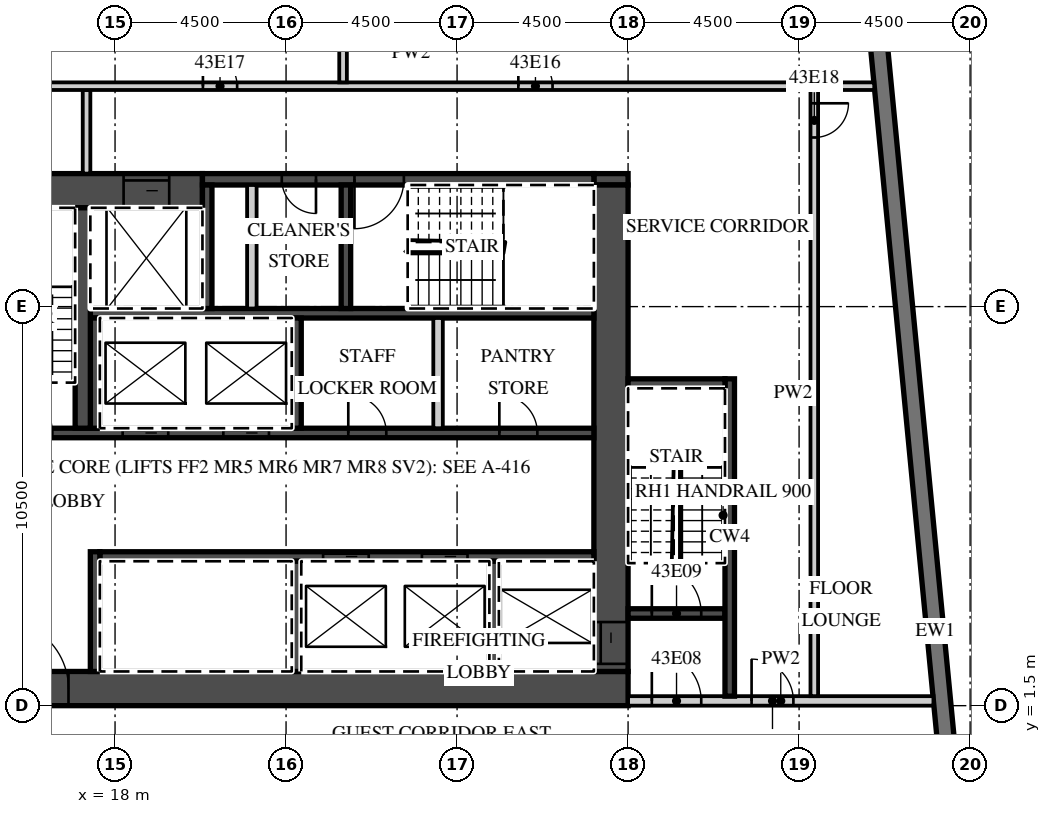
"""IFC4 building model, lengths in metres.
Left out: names, types, materials, properties, quantities, classifications, styles, units other than length and angle.
Written with IfcOpenShell. Run it as: python <this file> out.ifc"""

import sys

from ifc_helpers import new_model, si_unit, direction, frame, frame_2d, origin, place, context, subcontext, project, spatial, rectangle, extrude, element, fill, save


model = new_model("IFC4")
c1 = context("Model", 3, precision=1e-05, world=origin(), true_north=direction((0.0, 1.0)))
c2 = subcontext(c1, "Body", "Model", "MODEL_VIEW")
j1 = project(units=[si_unit("LENGTHUNIT", "METRE"), si_unit("PLANEANGLEUNIT", "RADIAN")], contexts=[c1])
p1 = place(None, origin())
s1 = spatial("IfcSite", under=j1, at=p1, CompositionType="ELEMENT")
p2 = place(p1, origin())
s2 = spatial("IfcBuilding", under=s1, at=p2, CompositionType="ELEMENT")
p3 = place(p2, frame((0.0, 0.0, 183.4)))
s3 = spatial("IfcBuildingStorey", under=s2, at=p3, CompositionType="ELEMENT", Elevation=183.4)
p4 = place(p3, frame((41.214, -13.466, 0.0), z_axis=(0.0, 0.0, 1.0), x_axis=(-0.095847314626, 0.995396047952, 0.0)))
e1 = element("IfcWall", 1, at=p4, inside=s3, PredefinedType="SOLIDWALL", context=c2, shape_type="SweptSolid", body=[
    extrude(rectangle(XDim=34.0, YDim=0.45, at=frame_2d((17.0, 0.0))), origin(), (0.0, 0.0, 1.0), 3.02),
])
p5 = place(p4, frame((3.869, 0.0, 0.45)))
e2 = element("IfcOpeningElement", 2, at=p5, cuts=e1, PredefinedType="OPENING", context=c2, shape_type="SweptSolid", body=[
    extrude(rectangle(XDim=3.3, YDim=2.25, at=frame_2d((1.65, 1.125))), frame((0.0, 0.235, 0.0), z_axis=(0.0, -1.0, 0.0), x_axis=(1.0, 0.0, 0.0)), (0.0, 0.0, 1.0), 0.47),
])
p6 = place(p4, frame((8.39, 0.0, 0.45)))
e3 = element("IfcOpeningElement", 3, at=p6, cuts=e1, PredefinedType="OPENING", context=c2, shape_type="SweptSolid", body=[
    extrude(rectangle(XDim=3.3, YDim=2.25, at=frame_2d((1.65, 1.125))), frame((0.0, 0.235, 0.0), z_axis=(0.0, -1.0, 0.0), x_axis=(1.0, 0.0, 0.0)), (0.0, 0.0, 1.0), 0.47),
])
p7 = place(p3, frame((13.5, 1.95, 0.0), z_axis=(0.0, 0.0, 1.0), x_axis=(1.0, 0.0, 0.0)))
e4 = element("IfcWall", 4, at=p7, inside=s3, PredefinedType="SHEAR", context=c2, shape_type="SweptSolid", body=[
    extrude(rectangle(XDim=18.0, YDim=0.9, at=frame_2d((9.0, 0.0))), origin(), (0.0, 0.0, 1.0), 3.02),
])
p8 = place(p7, frame((1.475, 0.0, 0.0)))
e5 = element("IfcOpeningElement", 5, at=p8, cuts=e4, PredefinedType="OPENING", context=c2, shape_type="SweptSolid", body=[
    extrude(rectangle(XDim=1.8, YDim=2.1, at=frame_2d((0.9, 1.05))), frame((0.0, 0.46, 0.0), z_axis=(0.0, -1.0, 0.0), x_axis=(1.0, 0.0, 0.0)), (0.0, 0.0, 1.0), 0.92),
])
p9 = place(p3, frame((13.5, 15.05, 0.0), z_axis=(0.0, 0.0, 1.0), x_axis=(1.0, 0.0, 0.0)))
e6 = element("IfcWall", 6, at=p9, inside=s3, PredefinedType="SHEAR", context=c2, shape_type="SweptSolid", body=[
    extrude(rectangle(XDim=6.8, YDim=0.9, at=frame_2d((3.4, 0.0))), origin(), (0.0, 0.0, 1.0), 3.02),
])
p10 = place(p9, frame((4.725, 0.0, 0.0)))
e7 = element("IfcOpeningElement", 7, at=p10, cuts=e6, PredefinedType="OPENING", context=c2, shape_type="SweptSolid", body=[
    extrude(rectangle(XDim=1.2, YDim=2.1, at=frame_2d((0.6, 1.05))), frame((0.0, 0.46, 0.0), z_axis=(0.0, -1.0, 0.0), x_axis=(1.0, 0.0, 0.0)), (0.0, 0.0, 1.0), 0.92),
])
p11 = place(p3, frame((30.6, 15.35, 0.0), z_axis=(0.0, 0.0, 1.0), x_axis=(1.0, 0.0, 0.0)))
e8 = element("IfcWall", 8, at=p11, inside=s3, PredefinedType="SHEAR", context=c2, shape_type="SweptSolid", body=[
    extrude(rectangle(XDim=0.9, YDim=0.3, at=frame_2d((0.45, 0.0))), origin(), (0.0, 0.0, 1.0), 3.02),
])
p12 = place(p3, frame((20.3, 15.35, 0.0), z_axis=(0.0, 0.0, 1.0), x_axis=(1.0, 0.0, 0.0)))
e9 = element("IfcWall", 9, at=p12, inside=s3, PredefinedType="SHEAR", context=c2, shape_type="SweptSolid", body=[
    extrude(rectangle(XDim=10.3, YDim=0.3, at=frame_2d((5.15, 0.0))), origin(), (0.0, 0.0, 1.0), 3.02),
])
p13 = place(p12, frame((4.0, 0.0, 0.0)))
e10 = element("IfcOpeningElement", 10, at=p13, cuts=e9, PredefinedType="OPENING", context=c2, shape_type="SweptSolid", body=[
    extrude(rectangle(XDim=1.3, YDim=2.1, at=frame_2d((0.65, 1.05))), frame((0.0, 0.16, 0.0), z_axis=(0.0, -1.0, 0.0), x_axis=(1.0, 0.0, 0.0)), (0.0, 0.0, 1.0), 0.32),
])
p14 = place(p12, frame((2.087, 0.0, 0.0)))
e11 = element("IfcOpeningElement", 11, at=p14, cuts=e9, PredefinedType="OPENING", context=c2, shape_type="SweptSolid", body=[
    extrude(rectangle(XDim=0.9, YDim=2.1, at=frame_2d((0.45, 1.05))), frame((0.0, 0.16, 0.0), z_axis=(0.0, -1.0, 0.0), x_axis=(1.0, 0.0, 0.0)), (0.0, 0.0, 1.0), 0.32),
])
p15 = place(p3, frame((31.05, 2.4, 0.0), z_axis=(0.0, 0.0, 1.0), x_axis=(0.0, 1.0, 0.0)))
e12 = element("IfcWall", 12, at=p15, inside=s3, PredefinedType="SHEAR", context=c2, shape_type="SweptSolid", body=[
    extrude(rectangle(XDim=12.8, YDim=0.9, at=frame_2d((6.4, 0.0))), origin(), (0.0, 0.0, 1.0), 3.02),
])
p16 = place(p15, frame((0.2, 0.0, 0.0)))
e13 = element("IfcOpeningElement", 13, at=p16, cuts=e12, PredefinedType="OPENING", context=c2, shape_type="SweptSolid", body=[
    extrude(rectangle(XDim=1.1, YDim=2.1, at=frame_2d((0.55, 1.05))), frame((0.0, 0.46, 0.0), z_axis=(0.0, -1.0, 0.0), x_axis=(1.0, 0.0, 0.0)), (0.0, 0.0, 1.0), 0.92),
])
p17 = place(p3, frame((17.6, 5.425, 0.0), z_axis=(0.0, 0.0, 1.0), x_axis=(1.0, 0.0, 0.0)))
e14 = element("IfcWall", 14, at=p17, inside=s3, PredefinedType="SHEAR", context=c2, shape_type="SweptSolid", body=[
    extrude(rectangle(XDim=13.0, YDim=0.25, at=frame_2d((6.5, 0.0))), origin(), (0.0, 0.0, 1.0), 3.02),
])
p18 = place(p17, frame((8.475, 0.0, 0.0)))
e15 = element("IfcOpeningElement", 15, at=p18, cuts=e14, PredefinedType="OPENING", context=c2, shape_type="SweptSolid", body=[
    extrude(rectangle(XDim=1.2, YDim=2.1, at=frame_2d((0.6, 1.05))), frame((0.0, 0.135, 0.0), z_axis=(0.0, -1.0, 0.0), x_axis=(1.0, 0.0, 0.0)), (0.0, 0.0, 1.0), 0.27),
])
p19 = place(p17, frame((5.875, 0.0, 0.0)))
e16 = element("IfcOpeningElement", 16, at=p19, cuts=e14, PredefinedType="OPENING", context=c2, shape_type="SweptSolid", body=[
    extrude(rectangle(XDim=1.2, YDim=2.1, at=frame_2d((0.6, 1.05))), frame((0.0, 0.135, 0.0), z_axis=(0.0, -1.0, 0.0), x_axis=(1.0, 0.0, 0.0)), (0.0, 0.0, 1.0), 0.27),
])
p20 = place(p3, frame((17.475, 2.4, 0.0), z_axis=(0.0, 0.0, 1.0), x_axis=(0.0, 1.0, 0.0)))
e17 = element("IfcWall", 17, at=p20, inside=s3, PredefinedType="SHEAR", context=c2, shape_type="SweptSolid", body=[
    extrude(rectangle(XDim=3.15, YDim=0.25, at=frame_2d((1.575, 0.0))), origin(), (0.0, 0.0, 1.0), 3.02),
])
for number, where, z_axis, x_axis in (
    (18, (27.975, 2.4, 0.0), (0.0, 0.0, 1.0), (0.0, 1.0, 0.0)),
    (19, (22.775, 2.4, 0.0), (0.0, 0.0, 1.0), (0.0, 1.0, 0.0)),
):
    element("IfcWall", number, at=place(p3, frame(where, z_axis=z_axis, x_axis=x_axis)), inside=s3, PredefinedType="SHEAR", context=c2, shape_type="SweptSolid", body=[
        extrude(rectangle(XDim=2.9, YDim=0.25, at=frame_2d((1.45, 0.0))), origin(), (0.0, 0.0, 1.0), 3.02),
    ])
p21 = place(p3, frame((14.4, 8.675, 0.0), z_axis=(0.0, 0.0, 1.0), x_axis=(1.0, 0.0, 0.0)))
e20 = element("IfcWall", 20, at=p21, inside=s3, PredefinedType="SHEAR", context=c2, shape_type="SweptSolid", body=[
    extrude(rectangle(XDim=16.2, YDim=0.25, at=frame_2d((8.1, 0.0))), origin(), (0.0, 0.0, 1.0), 3.02),
])
p22 = place(p21, frame((6.45, 0.0, 0.0)))
e21 = element("IfcOpeningElement", 21, at=p22, cuts=e20, PredefinedType="OPENING", context=c2, shape_type="SweptSolid", body=[
    extrude(rectangle(XDim=1.2, YDim=2.1, at=frame_2d((0.6, 1.05))), frame((0.0, 0.135, 0.0), z_axis=(0.0, -1.0, 0.0), x_axis=(1.0, 0.0, 0.0)), (0.0, 0.0, 1.0), 0.27),
])
p23 = place(p21, frame((3.8, 0.0, 0.0)))
e22 = element("IfcOpeningElement", 22, at=p23, cuts=e20, PredefinedType="OPENING", context=c2, shape_type="SweptSolid", body=[
    extrude(rectangle(XDim=1.2, YDim=2.1, at=frame_2d((0.6, 1.05))), frame((0.0, 0.135, 0.0), z_axis=(0.0, -1.0, 0.0), x_axis=(1.0, 0.0, 0.0)), (0.0, 0.0, 1.0), 0.27),
])
p24 = place(p21, frame((0.65, 0.0, 0.0)))
e23 = element("IfcOpeningElement", 23, at=p24, cuts=e20, PredefinedType="OPENING", context=c2, shape_type="SweptSolid", body=[
    extrude(rectangle(XDim=1.3, YDim=2.1, at=frame_2d((0.65, 1.05))), frame((0.0, 0.135, 0.0), z_axis=(0.0, -1.0, 0.0), x_axis=(1.0, 0.0, 0.0)), (0.0, 0.0, 1.0), 0.27),
])
p25 = place(p21, frame((13.712, 0.0, 0.0)))
e24 = element("IfcOpeningElement", 24, at=p25, cuts=e20, PredefinedType="OPENING", context=c2, shape_type="SweptSolid", body=[
    extrude(rectangle(XDim=1.0, YDim=2.1, at=frame_2d((0.5, 1.05))), frame((0.0, 0.135, 0.0), z_axis=(0.0, -1.0, 0.0), x_axis=(1.0, 0.0, 0.0)), (0.0, 0.0, 1.0), 0.27),
])
p26 = place(p21, frame((9.738, 0.0, 0.0)))
e25 = element("IfcOpeningElement", 25, at=p26, cuts=e20, PredefinedType="OPENING", context=c2, shape_type="SweptSolid", body=[
    extrude(rectangle(XDim=1.0, YDim=2.1, at=frame_2d((0.5, 1.05))), frame((0.0, 0.135, 0.0), z_axis=(0.0, -1.0, 0.0), x_axis=(1.0, 0.0, 0.0)), (0.0, 0.0, 1.0), 0.27),
])
p27 = place(p3, frame((17.35, 11.825, 0.0), z_axis=(0.0, 0.0, 1.0), x_axis=(1.0, 0.0, 0.0)))
e26 = element("IfcWall", 26, at=p27, inside=s3, PredefinedType="SHEAR", context=c2, shape_type="SweptSolid", body=[
    extrude(rectangle(XDim=13.25, YDim=0.25, at=frame_2d((6.625, 0.0))), origin(), (0.0, 0.0, 1.0), 3.02),
])
for number, where, z_axis, x_axis in (
    (27, (17.475, 8.8, 0.0), (0.0, 0.0, 1.0), (0.0, 1.0, 0.0)),
    (28, (22.775, 8.8, 0.0), (0.0, 0.0, 1.0), (0.0, 1.0, 0.0)),
):
    element("IfcWall", number, at=place(p3, frame(where, z_axis=z_axis, x_axis=x_axis)), inside=s3, PredefinedType="SHEAR", context=c2, shape_type="SweptSolid", body=[
        extrude(rectangle(XDim=2.9, YDim=0.25, at=frame_2d((1.45, 0.0))), origin(), (0.0, 0.0, 1.0), 3.02),
    ])
p28 = place(p3, frame((26.5, 8.8, 0.0), z_axis=(0.0, 0.0, 1.0), x_axis=(0.0, 1.0, 0.0)))
e29 = element("IfcWall", 29, at=p28, inside=s3, PredefinedType="PARTITIONING", context=c2, shape_type="SweptSolid", body=[
    extrude(rectangle(XDim=2.9, YDim=0.25, at=frame_2d((1.45, 0.0))), origin(), (0.0, 0.0, 1.0), 3.02),
])
p29 = place(p3, frame((17.15, 8.8, 0.0), z_axis=(0.0, 0.0, 1.0), x_axis=(0.0, 1.0, 0.0)))
e30 = element("IfcWall", 30, at=p29, inside=s3, PredefinedType="SHEAR", context=c2, shape_type="SweptSolid", body=[
    extrude(rectangle(XDim=5.8, YDim=0.4, at=frame_2d((2.9, 0.0))), origin(), (0.0, 0.0, 1.0), 3.02),
])
for number, where, z_axis, x_axis in (
    (31, (20.425, 11.95, 0.0), (0.0, 0.0, 1.0), (0.0, 1.0, 0.0)),
    (32, (24.075, 11.95, 0.0), (0.0, 0.0, 1.0), (0.0, 1.0, 0.0)),
):
    element("IfcWall", number, at=place(p3, frame(where, z_axis=z_axis, x_axis=x_axis)), inside=s3, PredefinedType="SHEAR", context=c2, shape_type="SweptSolid", body=[
        extrude(rectangle(XDim=3.25, YDim=0.25, at=frame_2d((1.625, 0.0))), origin(), (0.0, 0.0, 1.0), 3.02),
    ])
p30 = place(p3, frame((21.6, 11.95, 0.0), z_axis=(0.0, 0.0, 1.0), x_axis=(0.0, 1.0, 0.0)))
e33 = element("IfcWall", 33, at=p30, inside=s3, PredefinedType="PARTITIONING", context=c2, shape_type="SweptSolid", body=[
    extrude(rectangle(XDim=3.25, YDim=0.25, at=frame_2d((1.625, 0.0))), origin(), (0.0, 0.0, 1.0), 3.02),
])
p31 = place(p3, frame((31.5, 1.625, 0.0), z_axis=(0.0, 0.0, 1.0), x_axis=(1.0, 0.0, 0.0)))
e34 = element("IfcWall", 34, at=p31, inside=s3, PredefinedType="PARTITIONING", context=c2, shape_type="SweptSolid", body=[
    extrude(rectangle(XDim=8.035, YDim=0.25, at=frame_2d((4.018, 0.0))), origin(), (0.0, 0.0, 1.0), 3.02),
])
p32 = place(p31, frame((0.625, 0.0, 0.0)))
e35 = element("IfcOpeningElement", 35, at=p32, cuts=e34, PredefinedType="OPENING", context=c2, shape_type="SweptSolid", body=[
    extrude(rectangle(XDim=1.3, YDim=2.1, at=frame_2d((0.65, 1.05))), frame((0.0, 0.135, 0.0), z_axis=(0.0, -1.0, 0.0), x_axis=(1.0, 0.0, 0.0)), (0.0, 0.0, 1.0), 0.27),
])
p33 = place(p31, frame((3.25, 0.0, 0.0)))
e36 = element("IfcOpeningElement", 36, at=p33, cuts=e34, PredefinedType="OPENING", context=c2, shape_type="SweptSolid", body=[
    extrude(rectangle(XDim=1.1, YDim=2.1, at=frame_2d((0.55, 1.05))), frame((0.0, 0.135, 0.0), z_axis=(0.0, -1.0, 0.0), x_axis=(1.0, 0.0, 0.0)), (0.0, 0.0, 1.0), 0.27),
])
p34 = place(p3, frame((31.5, 3.925, 0.0), z_axis=(0.0, 0.0, 1.0), x_axis=(1.0, 0.0, 0.0)))
e37 = element("IfcWall", 37, at=p34, inside=s3, PredefinedType="SHEAR", context=c2, shape_type="SweptSolid", body=[
    extrude(rectangle(XDim=2.55, YDim=0.25, at=frame_2d((1.275, 0.0))), origin(), (0.0, 0.0, 1.0), 3.02),
])
p35 = place(p34, frame((0.625, 0.0, 0.0)))
e38 = element("IfcOpeningElement", 38, at=p35, cuts=e37, PredefinedType="OPENING", context=c2, shape_type="SweptSolid", body=[
    extrude(rectangle(XDim=1.3, YDim=2.1, at=frame_2d((0.65, 1.05))), frame((0.0, 0.135, 0.0), z_axis=(0.0, -1.0, 0.0), x_axis=(1.0, 0.0, 0.0)), (0.0, 0.0, 1.0), 0.27),
])
p36 = place(p3, frame((34.175, 1.75, 0.0), z_axis=(0.0, 0.0, 1.0), x_axis=(0.0, 1.0, 0.0)))
e39 = element("IfcWall", 39, at=p36, inside=s3, PredefinedType="SHEAR", context=c2, shape_type="SweptSolid", body=[
    extrude(rectangle(XDim=8.35, YDim=0.25, at=frame_2d((4.175, 0.0))), origin(), (0.0, 0.0, 1.0), 3.02),
])
p37 = place(p3, frame((31.5, 9.975, 0.0), z_axis=(0.0, 0.0, 1.0), x_axis=(1.0, 0.0, 0.0)))
e40 = element("IfcWall", 40, at=p37, inside=s3, PredefinedType="SHEAR", context=c2, shape_type="SweptSolid", body=[
    extrude(rectangle(XDim=2.55, YDim=0.25, at=frame_2d((1.275, 0.0))), origin(), (0.0, 0.0, 1.0), 3.02),
])
p38 = place(p3, frame((17.25, 15.5, 0.0), z_axis=(0.0, 0.0, 1.0), x_axis=(0.0, 1.0, 0.0)))
e41 = element("IfcWall", 41, at=p38, inside=s3, PredefinedType="PARTITIONING", context=c2, shape_type="SweptSolid", body=[
    extrude(rectangle(XDim=2.2, YDim=0.2, at=frame_2d((1.1, 0.0))), origin(), (0.0, 0.0, 1.0), 3.02),
])
p39 = place(p3, frame((36.4, 1.75, 0.0), z_axis=(0.0, 0.0, 1.0), x_axis=(0.0, 1.0, 0.0)))
e42 = element("IfcWall", 42, at=p39, inside=s3, PredefinedType="PARTITIONING", context=c2, shape_type="SweptSolid", body=[
    extrude(rectangle(XDim=15.95, YDim=0.2, at=frame_2d((7.975, 0.0))), origin(), (0.0, 0.0, 1.0), 3.02),
])
p40 = place(p39, frame((14.7, 0.0, 0.0)))
e43 = element("IfcOpeningElement", 43, at=p40, cuts=e42, PredefinedType="OPENING", context=c2, shape_type="SweptSolid", body=[
    extrude(rectangle(XDim=0.9, YDim=2.1, at=frame_2d((0.45, 1.05))), frame((0.0, 0.11, 0.0), z_axis=(0.0, -1.0, 0.0), x_axis=(1.0, 0.0, 0.0)), (0.0, 0.0, 1.0), 0.22),
])
p41 = place(p3, frame((13.6, 17.8, 0.0), z_axis=(0.0, 0.0, 1.0), x_axis=(1.0, 0.0, 0.0)))
e44 = element("IfcWall", 44, at=p41, inside=s3, PredefinedType="PARTITIONING", context=c2, shape_type="SweptSolid", body=[
    extrude(rectangle(XDim=24.378, YDim=0.2, at=frame_2d((12.189, 0.0))), origin(), (0.0, 0.0, 1.0), 3.02),
])
p42 = place(p41, frame((15.012, 0.0, 0.0)))
e45 = element("IfcOpeningElement", 45, at=p42, cuts=e44, PredefinedType="OPENING", context=c2, shape_type="SweptSolid", body=[
    extrude(rectangle(XDim=0.9, YDim=2.1, at=frame_2d((0.45, 1.05))), frame((0.0, 0.11, 0.0), z_axis=(0.0, -1.0, 0.0), x_axis=(1.0, 0.0, 0.0)), (0.0, 0.0, 1.0), 0.22),
])
p43 = place(p41, frame((6.712, 0.0, 0.0)))
e46 = element("IfcOpeningElement", 46, at=p43, cuts=e44, PredefinedType="OPENING", context=c2, shape_type="SweptSolid", body=[
    extrude(rectangle(XDim=0.9, YDim=2.1, at=frame_2d((0.45, 1.05))), frame((0.0, 0.11, 0.0), z_axis=(0.0, -1.0, 0.0), x_axis=(1.0, 0.0, 0.0)), (0.0, 0.0, 1.0), 0.22),
])
p44 = place(p3, frame((24.0, 17.9, 0.0), z_axis=(0.0, 0.0, 1.0), x_axis=(0.0, 1.0, 0.0)))
e47 = element("IfcWall", 47, at=p44, inside=s3, PredefinedType="PARTITIONING", context=c2, shape_type="SweptSolid", body=[
    extrude(rectangle(XDim=4.701, YDim=0.2, at=frame_2d((2.351, 0.0))), origin(), (0.0, 0.0, 1.0), 3.02),
])
p45 = place(p22, origin())
e48 = element("IfcDoor", 48, at=p45, inside=s3, OperationType="SLIDING_TO_LEFT", PredefinedType="DOOR", context=c2, shape_type="SweptSolid", body=[
    extrude(rectangle(XDim=1.2, YDim=2.1, at=frame_2d((0.6, 1.05))), frame((0.0, 0.025, 0.0), z_axis=(0.0, -1.0, 0.0), x_axis=(1.0, 0.0, 0.0)), (0.0, 0.0, 1.0), 0.05),
])
fill(e21, e48)
p46 = place(p23, origin())
e49 = element("IfcDoor", 49, at=p46, inside=s3, OperationType="SLIDING_TO_RIGHT", PredefinedType="DOOR", context=c2, shape_type="SweptSolid", body=[
    extrude(rectangle(XDim=1.2, YDim=2.1, at=frame_2d((0.6, 1.05))), frame((0.0, 0.025, 0.0), z_axis=(0.0, -1.0, 0.0), x_axis=(1.0, 0.0, 0.0)), (0.0, 0.0, 1.0), 0.05),
])
fill(e22, e49)
p47 = place(p18, origin())
e50 = element("IfcDoor", 50, at=p47, inside=s3, OperationType="SLIDING_TO_LEFT", PredefinedType="DOOR", context=c2, shape_type="SweptSolid", body=[
    extrude(rectangle(XDim=1.2, YDim=2.1, at=frame_2d((0.6, 1.05))), frame((0.0, 0.025, 0.0), z_axis=(0.0, -1.0, 0.0), x_axis=(1.0, 0.0, 0.0)), (0.0, 0.0, 1.0), 0.05),
])
fill(e15, e50)
p48 = place(p19, origin())
e51 = element("IfcDoor", 51, at=p48, inside=s3, OperationType="SLIDING_TO_RIGHT", PredefinedType="DOOR", context=c2, shape_type="SweptSolid", body=[
    extrude(rectangle(XDim=1.2, YDim=2.1, at=frame_2d((0.6, 1.05))), frame((0.0, 0.025, 0.0), z_axis=(0.0, -1.0, 0.0), x_axis=(1.0, 0.0, 0.0)), (0.0, 0.0, 1.0), 0.05),
])
fill(e16, e51)
p49 = place(p10, origin())
e52 = element("IfcDoor", 52, at=p49, inside=s3, OperationType="SLIDING_TO_LEFT", PredefinedType="DOOR", context=c2, shape_type="SweptSolid", body=[
    extrude(rectangle(XDim=1.2, YDim=2.1, at=frame_2d((0.6, 1.05))), frame((0.0, 0.025, 0.0), z_axis=(0.0, -1.0, 0.0), x_axis=(1.0, 0.0, 0.0)), (0.0, 0.0, 1.0), 0.05),
])
fill(e7, e52)
p50 = place(p16, origin())
e53 = element("IfcDoor", 53, at=p50, inside=s3, OperationType="SLIDING_TO_LEFT", PredefinedType="DOOR", context=c2, shape_type="SweptSolid", body=[
    extrude(rectangle(XDim=1.1, YDim=2.1, at=frame_2d((0.55, 1.05))), frame((0.0, 0.025, 0.0), z_axis=(0.0, -1.0, 0.0), x_axis=(1.0, 0.0, 0.0)), (0.0, 0.0, 1.0), 0.05),
])
fill(e13, e53)
p51 = place(p8, origin())
e54 = element("IfcDoor", 54, at=p51, inside=s3, OperationType="DOUBLE_DOOR_DOUBLE_SWING", PredefinedType="DOOR", context=c2, shape_type="SweptSolid", body=[
    extrude(rectangle(XDim=1.8, YDim=2.1, at=frame_2d((0.9, 1.05))), frame((0.0, 0.025, 0.0), z_axis=(0.0, -1.0, 0.0), x_axis=(1.0, 0.0, 0.0)), (0.0, 0.0, 1.0), 0.05),
])
fill(e5, e54)
p52 = place(p32, origin())
e55 = element("IfcDoor", 55, at=p52, inside=s3, OperationType="SINGLE_SWING_LEFT", PredefinedType="DOOR", context=c2, shape_type="SweptSolid", body=[
    extrude(rectangle(XDim=1.3, YDim=2.1, at=frame_2d((0.65, 1.05))), frame((0.0, 0.025, 0.0), z_axis=(0.0, -1.0, 0.0), x_axis=(1.0, 0.0, 0.0)), (0.0, 0.0, 1.0), 0.05),
])
fill(e35, e55)
p53 = place(p35, origin())
e56 = element("IfcDoor", 56, at=p53, inside=s3, OperationType="SINGLE_SWING_LEFT", PredefinedType="DOOR", context=c2, shape_type="SweptSolid", body=[
    extrude(rectangle(XDim=1.3, YDim=2.1, at=frame_2d((0.65, 1.05))), frame((0.0, 0.025, 0.0), z_axis=(0.0, -1.0, 0.0), x_axis=(1.0, 0.0, 0.0)), (0.0, 0.0, 1.0), 0.05),
])
fill(e38, e56)
p54 = place(p33, origin())
e57 = element("IfcDoor", 57, at=p54, inside=s3, OperationType="SINGLE_SWING_LEFT", PredefinedType="DOOR", context=c2, shape_type="SweptSolid", body=[
    extrude(rectangle(XDim=1.1, YDim=2.1, at=frame_2d((0.55, 1.05))), frame((0.0, 0.025, 0.0), z_axis=(0.0, -1.0, 0.0), x_axis=(1.0, 0.0, 0.0)), (0.0, 0.0, 1.0), 0.05),
])
fill(e36, e57)
p55 = place(p13, origin())
e58 = element("IfcDoor", 58, at=p55, inside=s3, OperationType="SINGLE_SWING_LEFT", PredefinedType="DOOR", context=c2, shape_type="SweptSolid", body=[
    extrude(rectangle(XDim=1.3, YDim=2.1, at=frame_2d((0.65, 1.05))), frame((0.0, 0.025, 0.0), z_axis=(0.0, -1.0, 0.0), x_axis=(1.0, 0.0, 0.0)), (0.0, 0.0, 1.0), 0.05),
])
fill(e10, e58)
p56 = place(p14, origin())
e59 = element("IfcDoor", 59, at=p56, inside=s3, OperationType="SINGLE_SWING_RIGHT", PredefinedType="DOOR", context=c2, shape_type="SweptSolid", body=[
    extrude(rectangle(XDim=0.9, YDim=2.1, at=frame_2d((0.45, 1.05))), frame((0.0, 0.025, 0.0), z_axis=(0.0, -1.0, 0.0), x_axis=(1.0, 0.0, 0.0)), (0.0, 0.0, 1.0), 0.05),
])
fill(e11, e59)
p57 = place(p25, origin())
e60 = element("IfcDoor", 60, at=p57, inside=s3, OperationType="SINGLE_SWING_LEFT", PredefinedType="DOOR", context=c2, shape_type="SweptSolid", body=[
    extrude(rectangle(XDim=1.0, YDim=2.1, at=frame_2d((0.5, 1.05))), frame((0.0, 0.025, 0.0), z_axis=(0.0, -1.0, 0.0), x_axis=(1.0, 0.0, 0.0)), (0.0, 0.0, 1.0), 0.05),
])
fill(e24, e60)
p58 = place(p26, origin())
e61 = element("IfcDoor", 61, at=p58, inside=s3, OperationType="SINGLE_SWING_LEFT", PredefinedType="DOOR", context=c2, shape_type="SweptSolid", body=[
    extrude(rectangle(XDim=1.0, YDim=2.1, at=frame_2d((0.5, 1.05))), frame((0.0, 0.025, 0.0), z_axis=(0.0, -1.0, 0.0), x_axis=(1.0, 0.0, 0.0)), (0.0, 0.0, 1.0), 0.05),
])
fill(e25, e61)
p59 = place(p42, origin())
e62 = element("IfcDoor", 62, at=p59, inside=s3, OperationType="SINGLE_SWING_LEFT", PredefinedType="DOOR", context=c2, shape_type="SweptSolid", body=[
    extrude(rectangle(XDim=0.9, YDim=2.1, at=frame_2d((0.45, 1.05))), frame((0.0, 0.025, 0.0), z_axis=(0.0, -1.0, 0.0), x_axis=(1.0, 0.0, 0.0)), (0.0, 0.0, 1.0), 0.05),
])
fill(e45, e62)
p60 = place(p43, origin())
e63 = element("IfcDoor", 63, at=p60, inside=s3, OperationType="SINGLE_SWING_LEFT", PredefinedType="DOOR", context=c2, shape_type="SweptSolid", body=[
    extrude(rectangle(XDim=0.9, YDim=2.1, at=frame_2d((0.45, 1.05))), frame((0.0, 0.025, 0.0), z_axis=(0.0, -1.0, 0.0), x_axis=(1.0, 0.0, 0.0)), (0.0, 0.0, 1.0), 0.05),
])
fill(e46, e63)
p61 = place(p40, origin())
e64 = element("IfcDoor", 64, at=p61, inside=s3, OperationType="SINGLE_SWING_RIGHT", PredefinedType="DOOR", context=c2, shape_type="SweptSolid", body=[
    extrude(rectangle(XDim=0.9, YDim=2.1, at=frame_2d((0.45, 1.05))), frame((0.0, 0.025, 0.0), z_axis=(0.0, -1.0, 0.0), x_axis=(1.0, 0.0, 0.0)), (0.0, 0.0, 1.0), 0.05),
])
fill(e43, e64)
save(model, sys.argv[1])
